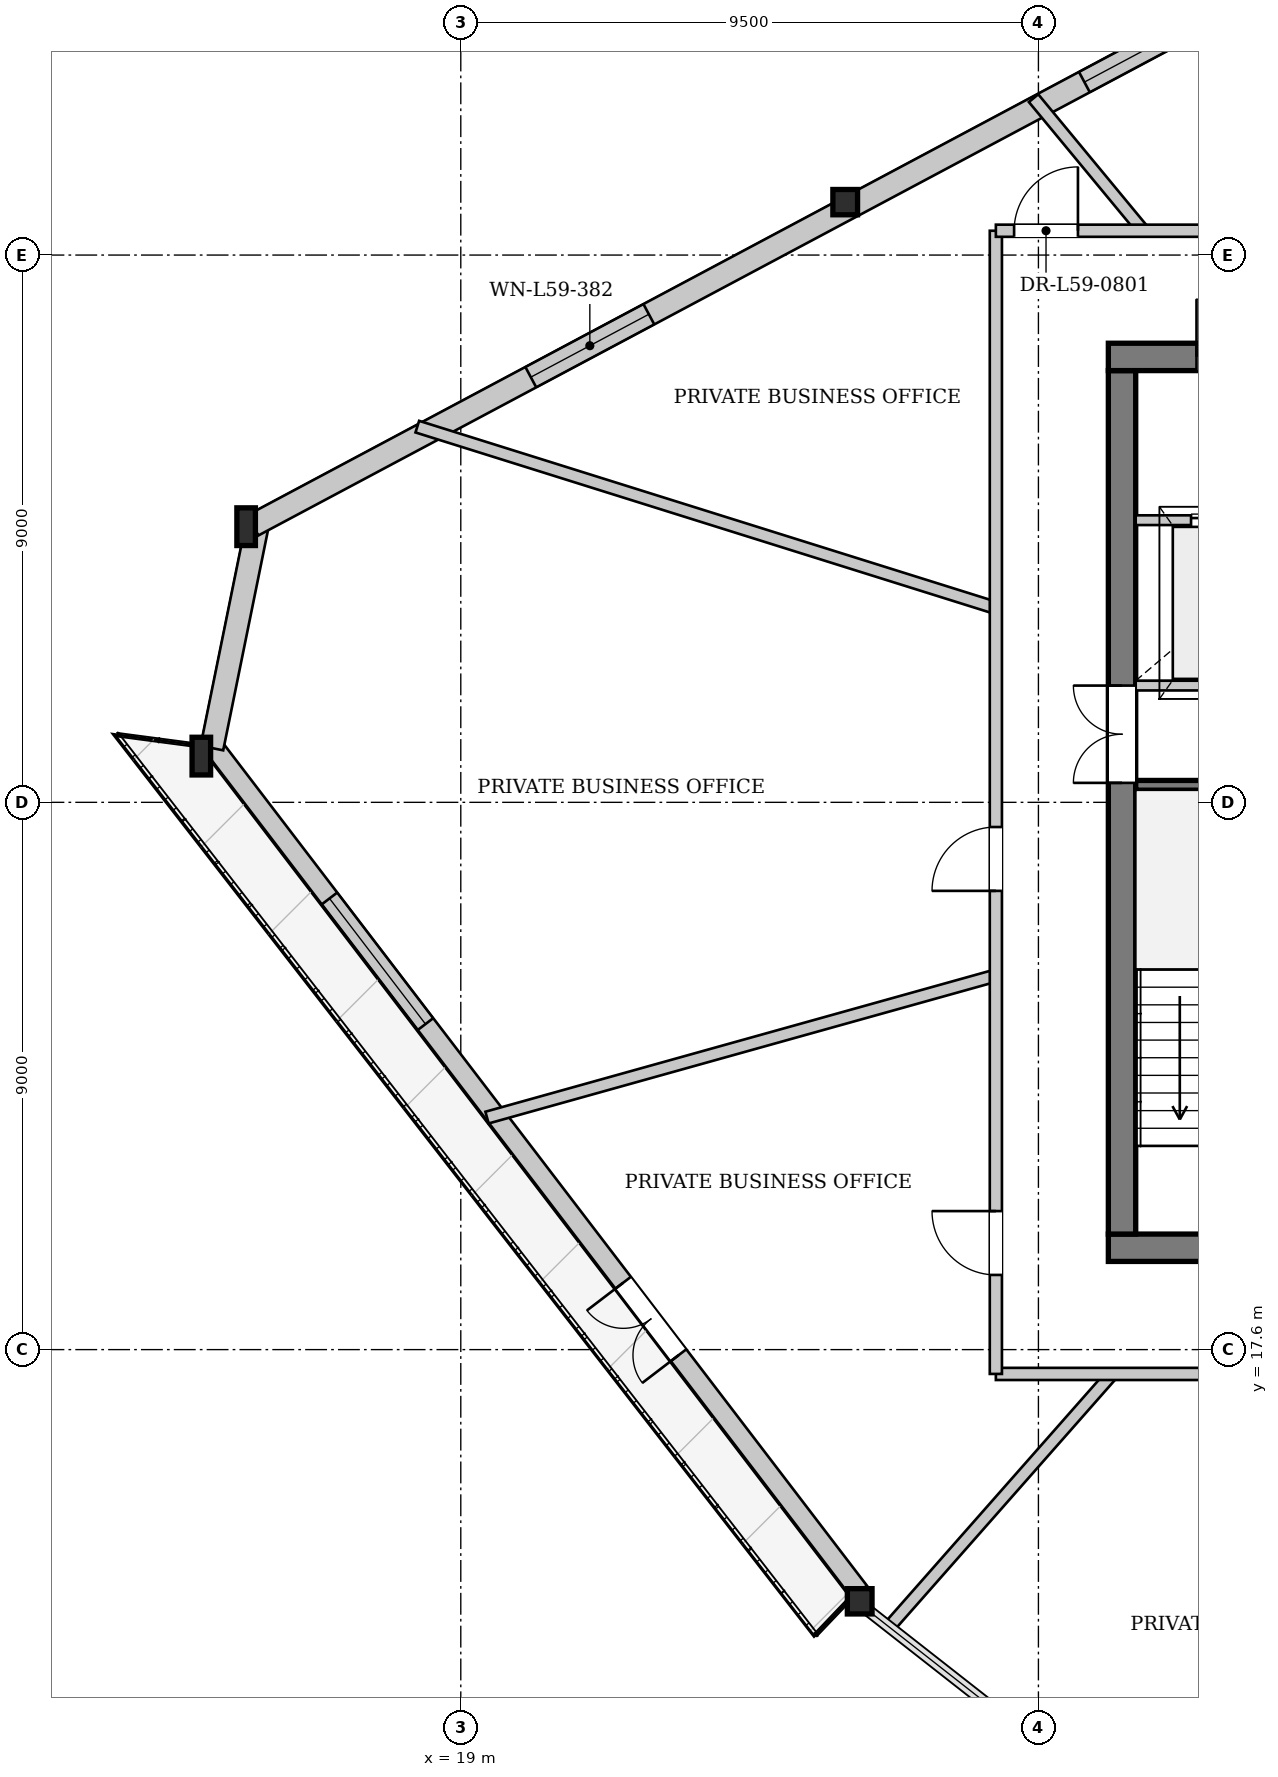
"""IFC4 building model, lengths in metres.
Left out: names, types, materials, properties, quantities, classifications, styles, units other than length and angle.
Written with IfcOpenShell. Run it as: python <this file> out.ifc"""

import sys

from ifc_helpers import new_model, si_unit, direction, frame, frame_2d, origin, origin_2d, place, context, subcontext, project, spatial, rectangle, i_section, extrude, source, transform, mapped, element, fill, save


model = new_model("IFC4")
c1 = context("Model", 3, precision=1e-05, world=origin(), true_north=direction((0.0, 1.0)))
c2 = subcontext(c1, "Body", "Model", "MODEL_VIEW")
j1 = project(units=[si_unit("LENGTHUNIT", "METRE"), si_unit("PLANEANGLEUNIT", "RADIAN")], contexts=[c1])
p1 = place(None, origin())
s1 = spatial("IfcSite", under=j1, at=p1, CompositionType="ELEMENT")
p2 = place(p1, origin())
s2 = spatial("IfcBuilding", under=s1, at=p2, CompositionType="ELEMENT")
p3 = place(p2, frame((0.0, 0.0, 223.8)))
s3 = spatial("IfcBuildingStorey", under=s2, at=p3, CompositionType="ELEMENT", Elevation=223.8)
m1 = source(origin(), c2, "Body", "SweptSolid", [
    extrude(i_section(OverallWidth=0.406, OverallDepth=0.416, WebThickness=0.027, FlangeThickness=0.042, at=origin_2d()), origin(), (0.0, 0.0, 1.0), 3.397),
])
p4 = place(p3, frame((25.387, 36.597, 0.0), z_axis=(-0.037947264299, -0.074816481317, 0.996475036946), x_axis=(0.891842269509, -0.452346511336, 0.0)))
e1 = element("IfcColumn", 1, at=p4, inside=s3, PredefinedType="COLUMN", context=c2, shape_type="MappedRepresentation", body=[
    mapped(m1, transform((0.0, 0.0, 0.0), x_axis=(1.0, 0.0, 0.0), y_axis=(0.0, 1.0, 0.0), z_axis=(0.0, 0.0, 1.0), scale=1.0)),
])
m2 = source(origin(), c2, "Body", "SweptSolid", [
    extrude(i_section(OverallWidth=0.305, OverallDepth=0.62, WebThickness=0.021, FlangeThickness=0.04, at=origin_2d()), origin(), (0.0, 0.0, 1.0), 3.407),
])
p5 = place(p3, frame((15.492, 31.324, 0.0), z_axis=(-0.012899647823, -0.111940277222, 0.993631205942), x_axis=(0.993425637614, -0.114479266819, 0.0)))
e2 = element("IfcColumn", 2, at=p5, inside=s3, PredefinedType="COLUMN", context=c2, shape_type="MappedRepresentation", body=[
    mapped(m2, transform((0.0, 0.0, 0.0), x_axis=(1.0, 0.0, 0.0), y_axis=(0.0, 1.0, 0.0), z_axis=(0.0, 0.0, 1.0), scale=1.0)),
])
m3 = source(origin(), c2, "Body", "SweptSolid", [
    extrude(i_section(OverallWidth=0.305, OverallDepth=0.62, WebThickness=0.021, FlangeThickness=0.04, at=origin_2d()), origin(), (0.0, 0.0, 1.0), 3.402),
])
p6 = place(p3, frame((14.72, 27.531, 0.0), z_axis=(0.007462960152, -0.100175888197, 0.994941754903), x_axis=(0.997236479656, 0.074292689029, 0.0)))
e3 = element("IfcColumn", 3, at=p6, inside=s3, PredefinedType="COLUMN", context=c2, shape_type="MappedRepresentation", body=[
    mapped(m3, transform((0.0, 0.0, 0.0), x_axis=(1.0, 0.0, 0.0), y_axis=(0.0, 1.0, 0.0), z_axis=(0.0, 0.0, 1.0), scale=1.0)),
])
m4 = source(origin(), c2, "Body", "SweptSolid", [
    extrude(i_section(OverallWidth=0.406, OverallDepth=0.416, WebThickness=0.027, FlangeThickness=0.042, at=origin_2d()), origin(), (0.0, 0.0, 1.0), 3.398),
])
p7 = place(p3, frame((25.425, 13.525, 0.0), z_axis=(0.080031554619, -0.037573162537, 0.996083936083), x_axis=(0.424975081245, 0.905205048771, 0.0)))
e4 = element("IfcColumn", 4, at=p7, inside=s3, PredefinedType="COLUMN", context=c2, shape_type="MappedRepresentation", body=[
    mapped(m4, transform((0.0, 0.0, 0.0), x_axis=(1.0, 0.0, 0.0), y_axis=(0.0, 1.0, 0.0), z_axis=(0.0, 0.0, 1.0), scale=1.0)),
])
p8 = place(p3, frame((25.552, 13.622, 0.0), z_axis=(0.0, 0.0, 1.0), x_axis=(-0.607219266327, 0.79453430549, 0.0)))
e5 = element("IfcWall", 5, at=p8, inside=s3, PredefinedType="SOLIDWALL", context=c2, shape_type="SweptSolid", body=[
    extrude(rectangle(XDim=17.628, YDim=0.32, at=frame_2d((8.814, 0.0))), origin(), (0.0, 0.0, 1.0), 2.822),
])
p9 = place(p8, frame((4.891, 0.0, 0.0)))
e6 = element("IfcOpeningElement", 6, at=p9, cuts=e5, PredefinedType="OPENING", context=c2, shape_type="SweptSolid", body=[
    extrude(rectangle(XDim=1.5, YDim=2.3, at=frame_2d((0.75, 1.15))), frame((0.0, 0.17, 0.0), z_axis=(0.0, -1.0, 0.0), x_axis=(1.0, 0.0, 0.0)), (0.0, 0.0, 1.0), 0.34),
])
p10 = place(p8, frame((11.745, 0.0, 0.352)))
e7 = element("IfcOpeningElement", 7, at=p10, cuts=e5, PredefinedType="OPENING", context=c2, shape_type="SweptSolid", body=[
    extrude(rectangle(XDim=2.6, YDim=2.35, at=frame_2d((1.3, 1.175))), frame((0.0, 0.17, 0.0), z_axis=(0.0, -1.0, 0.0), x_axis=(1.0, 0.0, 0.0)), (0.0, 0.0, 1.0), 0.34),
])
p11 = place(p3, frame((14.906, 27.493, 0.0), z_axis=(0.0, 0.0, 1.0), x_axis=(0.199317364457, 0.979934991837, 0.0)))
e8 = element("IfcWall", 8, at=p11, inside=s3, PredefinedType="SOLIDWALL", context=c2, shape_type="SweptSolid", body=[
    extrude(rectangle(XDim=3.871, YDim=0.38, at=frame_2d((1.935, 0.0))), origin(), (0.0, 0.0, 1.0), 2.822),
])
p12 = place(p3, frame((15.581, 31.156, 0.0), z_axis=(0.0, 0.0, 1.0), x_axis=(0.882484000586, 0.470342416448, 0.0)))
e9 = element("IfcWall", 9, at=p12, inside=s3, PredefinedType="SOLIDWALL", context=c2, shape_type="SweptSolid", body=[
    extrude(rectangle(XDim=22.425, YDim=0.38, at=frame_2d((11.213, 0.0))), origin(), (0.0, 0.0, 1.0), 2.822),
])
p13 = place(p12, frame((5.179, 0.0, 0.452)))
e10 = element("IfcOpeningElement", 10, at=p13, cuts=e9, PredefinedType="OPENING", context=c2, shape_type="SweptSolid", body=[
    extrude(rectangle(XDim=2.2, YDim=2.25, at=frame_2d((1.1, 1.125))), frame((0.0, 0.2, 0.0), z_axis=(0.0, -1.0, 0.0), x_axis=(1.0, 0.0, 0.0)), (0.0, 0.0, 1.0), 0.4),
])
p14 = place(p12, frame((15.496, 0.0, 0.452)))
e11 = element("IfcOpeningElement", 11, at=p14, cuts=e9, PredefinedType="OPENING", context=c2, shape_type="SweptSolid", body=[
    extrude(rectangle(XDim=2.2, YDim=2.25, at=frame_2d((1.1, 1.125))), frame((0.0, 0.2, 0.0), z_axis=(0.0, -1.0, 0.0), x_axis=(1.0, 0.0, 0.0)), (0.0, 0.0, 1.0), 0.4),
])
p15 = place(p3, frame((46.35, 19.275, 0.0), z_axis=(0.0, 0.0, 1.0), x_axis=(-1.0, 0.0, 0.0)))
e12 = element("IfcWall", 12, at=p15, inside=s3, PredefinedType="SHEAR", context=c2, shape_type="SweptSolid", body=[
    extrude(rectangle(XDim=16.7, YDim=0.45, at=frame_2d((8.35, 0.0))), origin(), (0.0, 0.0, 1.0), 3.33),
])
p16 = place(p15, frame((4.55, 0.0, 0.0)))
e13 = element("IfcOpeningElement", 13, at=p16, cuts=e12, PredefinedType="OPENING", context=c2, shape_type="SweptSolid", body=[
    extrude(rectangle(XDim=1.12, YDim=2.25, at=frame_2d((0.56, 1.125))), frame((0.0, 0.235, 0.0), z_axis=(0.0, -1.0, 0.0), x_axis=(1.0, 0.0, 0.0)), (0.0, 0.0, 1.0), 0.47),
])
p17 = place(p15, frame((11.05, 0.0, 0.0)))
e14 = element("IfcOpeningElement", 14, at=p17, cuts=e12, PredefinedType="OPENING", context=c2, shape_type="SweptSolid", body=[
    extrude(rectangle(XDim=1.12, YDim=2.25, at=frame_2d((0.56, 1.125))), frame((0.0, 0.235, 0.0), z_axis=(0.0, -1.0, 0.0), x_axis=(1.0, 0.0, 0.0)), (0.0, 0.0, 1.0), 0.47),
])
p18 = place(p3, frame((29.875, 19.5, 0.0), z_axis=(0.0, 0.0, 1.0), x_axis=(0.0, 1.0, 0.0)))
e15 = element("IfcWall", 15, at=p18, inside=s3, PredefinedType="SHEAR", context=c2, shape_type="SweptSolid", body=[
    extrude(rectangle(XDim=14.2, YDim=0.45, at=frame_2d((7.1, 0.0))), origin(), (0.0, 0.0, 1.0), 3.33),
])
p19 = place(p18, frame((7.42, 0.0, 0.0)))
e16 = element("IfcOpeningElement", 16, at=p19, cuts=e15, PredefinedType="OPENING", context=c2, shape_type="SweptSolid", body=[
    extrude(rectangle(XDim=1.6, YDim=2.2, at=frame_2d((0.8, 1.1))), frame((0.0, 0.235, 0.0), z_axis=(0.0, -1.0, 0.0), x_axis=(1.0, 0.0, 0.0)), (0.0, 0.0, 1.0), 0.47),
])
p20 = place(p3, frame((29.65, 33.925, 0.0), z_axis=(0.0, 0.0, 1.0), x_axis=(1.0, 0.0, 0.0)))
e17 = element("IfcWall", 17, at=p20, inside=s3, PredefinedType="SHEAR", context=c2, shape_type="SweptSolid", body=[
    extrude(rectangle(XDim=16.7, YDim=0.45, at=frame_2d((8.35, 0.0))), origin(), (0.0, 0.0, 1.0), 3.33),
])
p21 = place(p20, frame((1.45, 0.0, 0.0)))
e18 = element("IfcOpeningElement", 18, at=p21, cuts=e17, PredefinedType="OPENING", context=c2, shape_type="SweptSolid", body=[
    extrude(rectangle(XDim=0.95, YDim=2.1, at=frame_2d((0.475, 1.05))), frame((0.0, 0.235, 0.0), z_axis=(0.0, -1.0, 0.0), x_axis=(1.0, 0.0, 0.0)), (0.0, 0.0, 1.0), 0.47),
])
p22 = place(p20, frame((3.83, 0.0, 0.0)))
e19 = element("IfcOpeningElement", 19, at=p22, cuts=e17, PredefinedType="OPENING", context=c2, shape_type="SweptSolid", body=[
    extrude(rectangle(XDim=1.32, YDim=2.2, at=frame_2d((0.66, 1.1))), frame((0.0, 0.235, 0.0), z_axis=(0.0, -1.0, 0.0), x_axis=(1.0, 0.0, 0.0)), (0.0, 0.0, 1.0), 0.47),
])
for number, where, z_axis, x_axis in (
    (20, (30.1, 26.88, 0.0), (0.0, 0.0, 1.0), (1.0, 0.0, 0.0)),
    (21, (30.1, 28.52, 0.0), (0.0, 0.0, 1.0), (1.0, 0.0, 0.0)),
):
    element("IfcWall", number, at=place(p3, frame(where, z_axis=z_axis, x_axis=x_axis)), inside=s3, PredefinedType="PARTITIONING", context=c2, shape_type="SweptSolid", body=[
        extrude(rectangle(XDim=3.02, YDim=0.16, at=frame_2d((1.51, 0.0))), origin(), (0.0, 0.0, 1.0), 3.33),
    ])
p23 = place(p3, frame((30.1, 31.24, 0.0), z_axis=(0.0, 0.0, 1.0), x_axis=(1.0, 0.0, 0.0)))
e22 = element("IfcWall", 22, at=p23, inside=s3, PredefinedType="PARTITIONING", context=c2, shape_type="SweptSolid", body=[
    extrude(rectangle(XDim=3.02, YDim=0.16, at=frame_2d((1.51, 0.0))), origin(), (0.0, 0.0, 1.0), 3.33),
])
p24 = place(p23, frame((0.91, 0.0, 0.0)))
e23 = element("IfcOpeningElement", 23, at=p24, cuts=e22, PredefinedType="OPENING", context=c2, shape_type="SweptSolid", body=[
    extrude(rectangle(XDim=1.2, YDim=2.2, at=frame_2d((0.6, 1.1))), frame((0.0, 0.09, 0.0), z_axis=(0.0, -1.0, 0.0), x_axis=(1.0, 0.0, 0.0)), (0.0, 0.0, 1.0), 0.18),
])
p25 = place(p3, frame((30.224, 36.0, 0.0), z_axis=(0.0, 0.0, 1.0), x_axis=(-0.637396404574, 0.770536062386, 0.0)))
e24 = element("IfcWall", 24, at=p25, inside=s3, PredefinedType="PARTITIONING", context=c2, shape_type="SweptSolid", body=[
    extrude(rectangle(XDim=2.829, YDim=0.2, at=frame_2d((1.415, 0.0))), origin(), (0.0, 0.0, 1.0), 3.33),
])
p26 = place(p3, frame((27.8, 29.796, 0.0), z_axis=(0.0, 0.0, 1.0), x_axis=(-0.954238311107, 0.299047229739, 0.0)))
e25 = element("IfcWall", 25, at=p26, inside=s3, PredefinedType="PARTITIONING", context=c2, shape_type="SweptSolid", body=[
    extrude(rectangle(XDim=9.971, YDim=0.2, at=frame_2d((4.986, 0.0))), origin(), (0.0, 0.0, 1.0), 3.33),
])
p27 = place(p3, frame((27.8, 23.752, 0.0), z_axis=(0.0, 0.0, 1.0), x_axis=(-0.963159579638, -0.268930519188, 0.0)))
e26 = element("IfcWall", 26, at=p27, inside=s3, PredefinedType="PARTITIONING", context=c2, shape_type="SweptSolid", body=[
    extrude(rectangle(XDim=8.689, YDim=0.2, at=frame_2d((4.344, 0.0))), origin(), (0.0, 0.0, 1.0), 3.33),
])
p28 = place(p3, frame((29.713, 17.2, 0.0), z_axis=(0.0, 0.0, 1.0), x_axis=(-0.661328876808, -0.750096071647, 0.0)))
e27 = element("IfcWall", 27, at=p28, inside=s3, PredefinedType="PARTITIONING", context=c2, shape_type="SweptSolid", body=[
    extrude(rectangle(XDim=5.517, YDim=0.2, at=frame_2d((2.759, 0.0))), origin(), (0.0, 0.0, 1.0), 3.33),
])
p29 = place(p3, frame((27.8, 17.2, 0.0), z_axis=(0.0, 0.0, 1.0), x_axis=(1.0, 0.0, 0.0)))
e28 = element("IfcWall", 28, at=p29, inside=s3, PredefinedType="PARTITIONING", context=c2, shape_type="SweptSolid", body=[
    extrude(rectangle(XDim=20.4, YDim=0.2, at=frame_2d((10.2, 0.0))), origin(), (0.0, 0.0, 1.0), 3.33),
])
p30 = place(p29, frame((4.762, 0.0, 0.0)))
e29 = element("IfcOpeningElement", 29, at=p30, cuts=e28, PredefinedType="OPENING", context=c2, shape_type="SweptSolid", body=[
    extrude(rectangle(XDim=1.05, YDim=2.2, at=frame_2d((0.525, 1.1))), frame((0.0, 0.11, 0.0), z_axis=(0.0, -1.0, 0.0), x_axis=(1.0, 0.0, 0.0)), (0.0, 0.0, 1.0), 0.22),
])
p31 = place(p29, frame((11.71, 0.0, 0.0)))
e30 = element("IfcOpeningElement", 30, at=p31, cuts=e28, PredefinedType="OPENING", context=c2, shape_type="SweptSolid", body=[
    extrude(rectangle(XDim=1.05, YDim=2.2, at=frame_2d((0.525, 1.1))), frame((0.0, 0.11, 0.0), z_axis=(0.0, -1.0, 0.0), x_axis=(1.0, 0.0, 0.0)), (0.0, 0.0, 1.0), 0.22),
])
p32 = place(p3, frame((27.8, 17.2, 0.0), z_axis=(0.0, 0.0, 1.0), x_axis=(0.0, 1.0, 0.0)))
e31 = element("IfcWall", 31, at=p32, inside=s3, PredefinedType="PARTITIONING", context=c2, shape_type="SweptSolid", body=[
    extrude(rectangle(XDim=18.8, YDim=0.2, at=frame_2d((9.4, 0.0))), origin(), (0.0, 0.0, 1.0), 3.33),
])
p33 = place(p32, frame((7.944, 0.0, 0.0)))
e32 = element("IfcOpeningElement", 32, at=p33, cuts=e31, PredefinedType="OPENING", context=c2, shape_type="SweptSolid", body=[
    extrude(rectangle(XDim=1.05, YDim=2.2, at=frame_2d((0.525, 1.1))), frame((0.0, 0.11, 0.0), z_axis=(0.0, -1.0, 0.0), x_axis=(1.0, 0.0, 0.0)), (0.0, 0.0, 1.0), 0.22),
])
p34 = place(p32, frame((1.628, 0.0, 0.0)))
e33 = element("IfcOpeningElement", 33, at=p34, cuts=e31, PredefinedType="OPENING", context=c2, shape_type="SweptSolid", body=[
    extrude(rectangle(XDim=1.05, YDim=2.2, at=frame_2d((0.525, 1.1))), frame((0.0, 0.11, 0.0), z_axis=(0.0, -1.0, 0.0), x_axis=(1.0, 0.0, 0.0)), (0.0, 0.0, 1.0), 0.22),
])
p35 = place(p3, frame((27.8, 36.0, 0.0), z_axis=(0.0, 0.0, 1.0), x_axis=(1.0, 0.0, 0.0)))
e34 = element("IfcWall", 34, at=p35, inside=s3, PredefinedType="PARTITIONING", context=c2, shape_type="SweptSolid", body=[
    extrude(rectangle(XDim=13.2, YDim=0.2, at=frame_2d((6.6, 0.0))), origin(), (0.0, 0.0, 1.0), 3.33),
])
p36 = place(p35, frame((11.85, 0.0, 0.0)))
e35 = element("IfcOpeningElement", 35, at=p36, cuts=e34, PredefinedType="OPENING", context=c2, shape_type="SweptSolid", body=[
    extrude(rectangle(XDim=1.05, YDim=2.2, at=frame_2d((0.525, 1.1))), frame((0.0, 0.11, 0.0), z_axis=(0.0, -1.0, 0.0), x_axis=(1.0, 0.0, 0.0)), (0.0, 0.0, 1.0), 0.22),
])
p37 = place(p35, frame((5.923, 0.0, 0.0)))
e36 = element("IfcOpeningElement", 36, at=p37, cuts=e34, PredefinedType="OPENING", context=c2, shape_type="SweptSolid", body=[
    extrude(rectangle(XDim=1.05, YDim=2.2, at=frame_2d((0.525, 1.1))), frame((0.0, 0.11, 0.0), z_axis=(0.0, -1.0, 0.0), x_axis=(1.0, 0.0, 0.0)), (0.0, 0.0, 1.0), 0.22),
])
p38 = place(p35, frame((0.3, 0.0, 0.0)))
e37 = element("IfcOpeningElement", 37, at=p38, cuts=e34, PredefinedType="OPENING", context=c2, shape_type="SweptSolid", body=[
    extrude(rectangle(XDim=1.05, YDim=2.2, at=frame_2d((0.525, 1.1))), frame((0.0, 0.11, 0.0), z_axis=(0.0, -1.0, 0.0), x_axis=(1.0, 0.0, 0.0)), (0.0, 0.0, 1.0), 0.22),
])
m5 = source(origin(), c2, "Body", "SweptSolid", [
    extrude(rectangle(XDim=1.5, YDim=2.3, at=frame_2d((0.75, 1.15))), frame((0.0, 0.025, 0.0), z_axis=(0.0, -1.0, 0.0), x_axis=(1.0, 0.0, 0.0)), (0.0, 0.0, 1.0), 0.05),
])
p39 = place(p9, origin())
e38 = element("IfcDoor", 38, at=p39, inside=s3, OperationType="DOUBLE_DOOR_SINGLE_SWING", PredefinedType="DOOR", context=c2, shape_type="MappedRepresentation", body=[
    mapped(m5, transform((0.0, 0.0, 0.0), x_axis=(1.0, 0.0, 0.0), y_axis=(0.0, 1.0, 0.0), z_axis=(0.0, 0.0, 1.0), scale=1.0)),
])
fill(e6, e38)
m6 = source(origin(), c2, "Body", "SweptSolid", [
    extrude(rectangle(XDim=2.6, YDim=2.35, at=frame_2d((1.3, 1.175))), frame((0.0, 0.03, 0.0), z_axis=(0.0, -1.0, 0.0), x_axis=(1.0, 0.0, 0.0)), (0.0, 0.0, 1.0), 0.06),
])
p40 = place(p10, origin())
e39 = element("IfcWindow", 39, at=p40, inside=s3, PartitioningType="SINGLE_PANEL", PredefinedType="WINDOW", context=c2, shape_type="MappedRepresentation", body=[
    mapped(m6, transform((0.0, 0.0, 0.0), x_axis=(1.0, 0.0, 0.0), y_axis=(0.0, 1.0, 0.0), z_axis=(0.0, 0.0, 1.0), scale=1.0)),
])
fill(e7, e39)
m7 = source(origin(), c2, "Body", "SweptSolid", [
    extrude(rectangle(XDim=2.2, YDim=2.25, at=frame_2d((1.1, 1.125))), frame((0.0, 0.03, 0.0), z_axis=(0.0, -1.0, 0.0), x_axis=(1.0, 0.0, 0.0)), (0.0, 0.0, 1.0), 0.06),
])
p41 = place(p13, origin())
e40 = element("IfcWindow", 40, at=p41, inside=s3, PartitioningType="SINGLE_PANEL", PredefinedType="WINDOW", context=c2, shape_type="MappedRepresentation", body=[
    mapped(m7, transform((0.0, 0.0, 0.0), x_axis=(1.0, 0.0, 0.0), y_axis=(0.0, 1.0, 0.0), z_axis=(0.0, 0.0, 1.0), scale=1.0)),
])
fill(e10, e40)
p42 = place(p14, origin())
e41 = element("IfcWindow", 41, at=p42, inside=s3, PartitioningType="SINGLE_PANEL", PredefinedType="WINDOW", context=c2, shape_type="MappedRepresentation", body=[
    mapped(m7, transform((0.0, 0.0, 0.0), x_axis=(1.0, 0.0, 0.0), y_axis=(0.0, 1.0, 0.0), z_axis=(0.0, 0.0, 1.0), scale=1.0)),
])
fill(e11, e41)
m8 = source(origin(), c2, "Body", "SweptSolid", [
    extrude(rectangle(XDim=1.6, YDim=2.2, at=frame_2d((0.8, 1.1))), frame((0.0, 0.025, 0.0), z_axis=(0.0, -1.0, 0.0), x_axis=(1.0, 0.0, 0.0)), (0.0, 0.0, 1.0), 0.05),
])
p43 = place(p19, origin())
e42 = element("IfcDoor", 42, at=p43, inside=s3, OperationType="DOUBLE_DOOR_SINGLE_SWING", PredefinedType="DOOR", context=c2, shape_type="MappedRepresentation", body=[
    mapped(m8, transform((0.0, 0.0, 0.0), x_axis=(1.0, 0.0, 0.0), y_axis=(0.0, 1.0, 0.0), z_axis=(0.0, 0.0, 1.0), scale=1.0)),
])
fill(e16, e42)
m9 = source(origin(), c2, "Body", "SweptSolid", [
    extrude(rectangle(XDim=0.95, YDim=2.1, at=frame_2d((0.475, 1.05))), frame((0.0, 0.025, 0.0), z_axis=(0.0, -1.0, 0.0), x_axis=(1.0, 0.0, 0.0)), (0.0, 0.0, 1.0), 0.05),
])
p44 = place(p21, origin())
e43 = element("IfcDoor", 43, at=p44, inside=s3, OperationType="SINGLE_SWING_LEFT", PredefinedType="DOOR", context=c2, shape_type="MappedRepresentation", body=[
    mapped(m9, transform((0.0, 0.0, 0.0), x_axis=(1.0, 0.0, 0.0), y_axis=(0.0, 1.0, 0.0), z_axis=(0.0, 0.0, 1.0), scale=1.0)),
])
fill(e18, e43)
m10 = source(origin(), c2, "Body", "SweptSolid", [
    extrude(rectangle(XDim=1.2, YDim=2.2, at=frame_2d((0.6, 1.1))), frame((0.0, 0.025, 0.0), z_axis=(0.0, -1.0, 0.0), x_axis=(1.0, 0.0, 0.0)), (0.0, 0.0, 1.0), 0.05),
])
p45 = place(p24, origin())
e44 = element("IfcDoor", 44, at=p45, inside=s3, OperationType="DOUBLE_DOOR_SLIDING", PredefinedType="DOOR", context=c2, shape_type="MappedRepresentation", body=[
    mapped(m10, transform((0.0, 0.0, 0.0), x_axis=(1.0, 0.0, 0.0), y_axis=(0.0, 1.0, 0.0), z_axis=(0.0, 0.0, 1.0), scale=1.0)),
])
fill(e23, e44)
m11 = source(origin(), c2, "Body", "SweptSolid", [
    extrude(rectangle(XDim=1.05, YDim=2.2, at=frame_2d((0.525, 1.1))), frame((0.0, 0.025, 0.0), z_axis=(0.0, -1.0, 0.0), x_axis=(1.0, 0.0, 0.0)), (0.0, 0.0, 1.0), 0.05),
])
p46 = place(p33, origin())
e45 = element("IfcDoor", 45, at=p46, inside=s3, OperationType="SINGLE_SWING_LEFT", PredefinedType="DOOR", context=c2, shape_type="MappedRepresentation", body=[
    mapped(m11, transform((0.0, 0.0, 0.0), x_axis=(1.0, 0.0, 0.0), y_axis=(0.0, 1.0, 0.0), z_axis=(0.0, 0.0, 1.0), scale=1.0)),
])
fill(e32, e45)
p47 = place(p34, origin())
e46 = element("IfcDoor", 46, at=p47, inside=s3, OperationType="SINGLE_SWING_RIGHT", PredefinedType="DOOR", context=c2, shape_type="MappedRepresentation", body=[
    mapped(m11, transform((0.0, 0.0, 0.0), x_axis=(1.0, 0.0, 0.0), y_axis=(0.0, 1.0, 0.0), z_axis=(0.0, 0.0, 1.0), scale=1.0)),
])
fill(e33, e46)
p48 = place(p38, origin())
e47 = element("IfcDoor", 47, at=p48, inside=s3, OperationType="SINGLE_SWING_RIGHT", PredefinedType="DOOR", context=c2, shape_type="MappedRepresentation", body=[
    mapped(m11, transform((0.0, 0.0, 0.0), x_axis=(1.0, 0.0, 0.0), y_axis=(0.0, 1.0, 0.0), z_axis=(0.0, 0.0, 1.0), scale=1.0)),
])
fill(e37, e47)
save(model, sys.argv[1])
